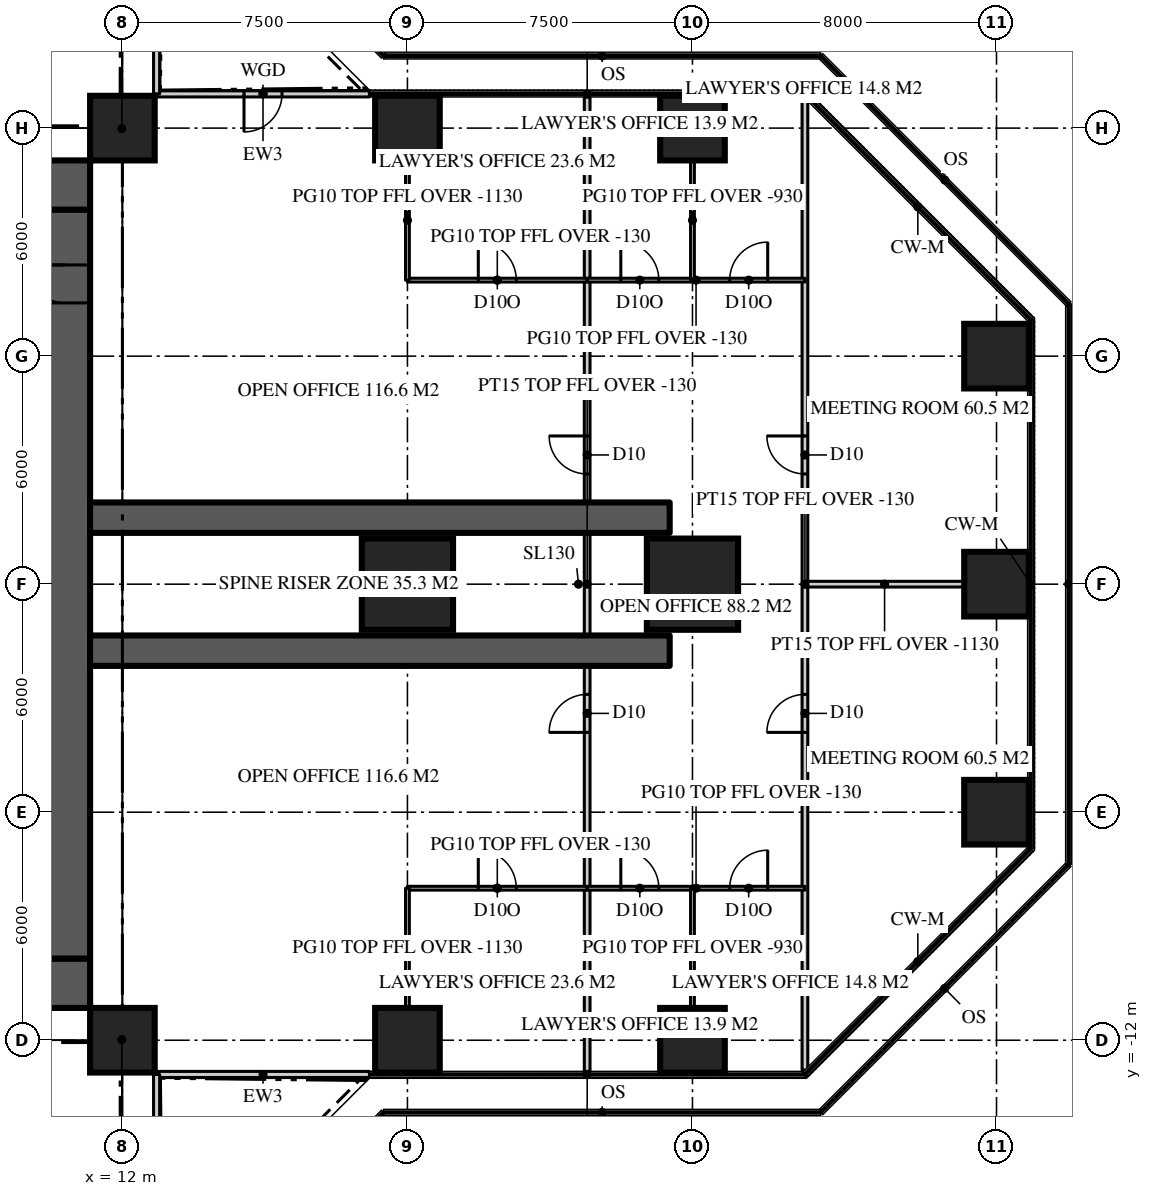
"""IFC4 building model, lengths in metres.
Left out: names, types, materials, properties, quantities, classifications, styles, units other than length and angle.
Written with IfcOpenShell. Run it as: python <this file> out.ifc"""

import sys

from ifc_helpers import new_model, si_unit, direction, frame, frame_2d, origin, origin_2d, place, context, subcontext, project, spatial, rectangle, extrude, element, fill, save


model = new_model("IFC4")
c1 = context("Model", 3, precision=1e-05, world=origin(), true_north=direction((0.0, 1.0)))
c2 = subcontext(c1, "Body", "Model", "MODEL_VIEW")
j1 = project(units=[si_unit("LENGTHUNIT", "METRE"), si_unit("PLANEANGLEUNIT", "RADIAN")], contexts=[c1])
p1 = place(None, origin())
s1 = spatial("IfcSite", under=j1, at=p1, CompositionType="ELEMENT")
p2 = place(p1, origin())
s2 = spatial("IfcBuilding", under=s1, at=p2, CompositionType="ELEMENT")
p3 = place(p2, frame((0.0, 0.0, 139.8)))
s3 = spatial("IfcBuildingStorey", under=s2, at=p3, CompositionType="ELEMENT", Elevation=139.8)
p4 = place(p3, frame((-11.15, 10.5, 0.0), z_axis=(0.0, 0.0, 1.0), x_axis=(1.0, 0.0, 0.0)))
e1 = element("IfcWall", 1, at=p4, inside=s3, PredefinedType="SHEAR", context=c2, shape_type="SweptSolid", body=[
    extrude(rectangle(XDim=22.3, YDim=1.3, at=frame_2d((11.15, 0.0))), origin(), (0.0, 0.0, 1.0), 3.9),
])
p5 = place(p4, frame((4.25, 0.0, 0.0)))
e2 = element("IfcOpeningElement", 2, at=p5, cuts=e1, PredefinedType="OPENING", context=c2, shape_type="SweptSolid", body=[
    extrude(rectangle(XDim=1.8, YDim=2.2, at=frame_2d((0.9, 1.1))), frame((0.0, 0.66, 0.0), z_axis=(0.0, -1.0, 0.0), x_axis=(1.0, 0.0, 0.0)), (0.0, 0.0, 1.0), 1.32),
])
p6 = place(p4, frame((16.25, 0.0, 0.0)))
e3 = element("IfcOpeningElement", 3, at=p6, cuts=e1, PredefinedType="OPENING", context=c2, shape_type="SweptSolid", body=[
    extrude(rectangle(XDim=1.8, YDim=2.2, at=frame_2d((0.9, 1.1))), frame((0.0, 0.66, 0.0), z_axis=(0.0, -1.0, 0.0), x_axis=(1.0, 0.0, 0.0)), (0.0, 0.0, 1.0), 1.32),
])
p7 = place(p3, frame((11.15, -10.5, 0.0), z_axis=(0.0, 0.0, 1.0), x_axis=(-1.0, 0.0, 0.0)))
e4 = element("IfcWall", 4, at=p7, inside=s3, PredefinedType="SHEAR", context=c2, shape_type="SweptSolid", body=[
    extrude(rectangle(XDim=22.3, YDim=1.3, at=frame_2d((11.15, 0.0))), origin(), (0.0, 0.0, 1.0), 3.9),
])
p8 = place(p7, frame((16.25, 0.0, 0.0)))
e5 = element("IfcOpeningElement", 5, at=p8, cuts=e4, PredefinedType="OPENING", context=c2, shape_type="SweptSolid", body=[
    extrude(rectangle(XDim=1.8, YDim=2.2, at=frame_2d((0.9, 1.1))), frame((0.0, 0.66, 0.0), z_axis=(0.0, -1.0, 0.0), x_axis=(1.0, 0.0, 0.0)), (0.0, 0.0, 1.0), 1.32),
])
p9 = place(p7, frame((4.25, 0.0, 0.0)))
e6 = element("IfcOpeningElement", 6, at=p9, cuts=e4, PredefinedType="OPENING", context=c2, shape_type="SweptSolid", body=[
    extrude(rectangle(XDim=1.8, YDim=2.2, at=frame_2d((0.9, 1.1))), frame((0.0, 0.66, 0.0), z_axis=(0.0, -1.0, 0.0), x_axis=(1.0, 0.0, 0.0)), (0.0, 0.0, 1.0), 1.32),
])
p10 = place(p3, frame((10.5, -9.85, 0.0), z_axis=(0.0, 0.0, 1.0), x_axis=(0.0, 1.0, 0.0)))
e7 = element("IfcWall", 7, at=p10, inside=s3, PredefinedType="SHEAR", context=c2, shape_type="SweptSolid", body=[
    extrude(rectangle(XDim=19.7, YDim=1.3, at=frame_2d((9.85, 0.0))), origin(), (0.0, 0.0, 1.0), 3.9),
])
p11 = place(p10, frame((17.25, 0.0, 0.0)))
e8 = element("IfcOpeningElement", 8, at=p11, cuts=e7, PredefinedType="OPENING", context=c2, shape_type="SweptSolid", body=[
    extrude(rectangle(XDim=1.0, YDim=2.2, at=frame_2d((0.5, 1.1))), frame((0.0, 0.66, 0.0), z_axis=(0.0, -1.0, 0.0), x_axis=(1.0, 0.0, 0.0)), (0.0, 0.0, 1.0), 1.32),
])
for number, where, z_axis, x_axis in (
    (9, (11.15, -1.75, 0.0), (0.0, 0.0, 1.0), (1.0, 0.0, 0.0)),
    (10, (11.15, 1.75, 0.0), (0.0, 0.0, 1.0), (1.0, 0.0, 0.0)),
):
    element("IfcWall", number, at=place(p3, frame(where, z_axis=z_axis, x_axis=x_axis)), inside=s3, PredefinedType="SHEAR", context=c2, shape_type="SweptSolid", body=[
        extrude(rectangle(XDim=15.25, YDim=0.8, at=frame_2d((7.625, 0.0))), origin(), (0.0, 0.0, 1.0), 3.9),
    ])
for number, where, z_axis, x_axis in (
    (11, (12.0, -12.0, 0.0), (0.0, 0.0, 1.0), (1.0, 0.0, 0.0)),
    (12, (19.5, -12.0, 0.0), (0.0, 0.0, 1.0), (1.0, 0.0, 0.0)),
    (13, (27.0, -12.0, 0.0), (0.0, 0.0, 1.0), (1.0, 0.0, 0.0)),
    (14, (35.0, -6.0, 0.0), (0.0, 0.0, 1.0), (1.0, 0.0, 0.0)),
):
    element("IfcColumn", number, at=place(p3, frame(where, z_axis=z_axis, x_axis=x_axis)), inside=s3, PredefinedType="COLUMN", context=c2, shape_type="SweptSolid", body=[
        extrude(rectangle(XDim=1.7, YDim=1.7, at=origin_2d()), origin(), (0.0, 0.0, 1.0), 3.9),
    ])
for number, where, z_axis, x_axis in (
    (15, (19.5, 0.0, 0.0), (0.0, 0.0, 1.0), (1.0, 0.0, 0.0)),
    (16, (27.0, 0.0, 0.0), (0.0, 0.0, 1.0), (1.0, 0.0, 0.0)),
):
    element("IfcColumn", number, at=place(p3, frame(where, z_axis=z_axis, x_axis=x_axis)), inside=s3, PredefinedType="COLUMN", context=c2, shape_type="SweptSolid", body=[
        extrude(rectangle(XDim=2.4, YDim=2.4, at=origin_2d()), origin(), (0.0, 0.0, 1.0), 3.9),
    ])
for number, where, z_axis, x_axis in (
    (17, (35.0, 0.0, 0.0), (0.0, 0.0, 1.0), (1.0, 0.0, 0.0)),
    (18, (35.0, 6.0, 0.0), (0.0, 0.0, 1.0), (1.0, 0.0, 0.0)),
    (19, (12.0, 12.0, 0.0), (0.0, 0.0, 1.0), (1.0, 0.0, 0.0)),
    (20, (19.5, 12.0, 0.0), (0.0, 0.0, 1.0), (1.0, 0.0, 0.0)),
    (21, (27.0, 12.0, 0.0), (0.0, 0.0, 1.0), (1.0, 0.0, 0.0)),
):
    element("IfcColumn", number, at=place(p3, frame(where, z_axis=z_axis, x_axis=x_axis)), inside=s3, PredefinedType="COLUMN", context=c2, shape_type="SweptSolid", body=[
        extrude(rectangle(XDim=1.7, YDim=1.7, at=origin_2d()), origin(), (0.0, 0.0, 1.0), 3.9),
    ])
p12 = place(p3, frame((12.9, -12.9, 0.0), z_axis=(0.0, 0.0, 1.0), x_axis=(1.0, 0.0, 0.0)))
e22 = element("IfcWall", 22, at=p12, inside=s3, PredefinedType="SOLIDWALL", context=c2, shape_type="SweptSolid", body=[
    extrude(rectangle(XDim=5.6, YDim=0.16, at=frame_2d((2.8, 0.0))), origin(), (0.0, 0.0, 1.0), 3.77),
])
p13 = place(p3, frame((18.5, 12.9, 0.0), z_axis=(0.0, 0.0, 1.0), x_axis=(-1.0, 0.0, 0.0)))
e23 = element("IfcWall", 23, at=p13, inside=s3, PredefinedType="SOLIDWALL", context=c2, shape_type="SweptSolid", body=[
    extrude(rectangle(XDim=5.6, YDim=0.16, at=frame_2d((2.8, 0.0))), origin(), (0.0, 0.0, 1.0), 3.77),
])
p14 = place(p13, frame((2.3, 0.0, 0.0)))
e24 = element("IfcOpeningElement", 24, at=p14, cuts=e23, PredefinedType="OPENING", context=c2, shape_type="SweptSolid", body=[
    extrude(rectangle(XDim=1.0, YDim=2.2, at=frame_2d((0.5, 1.1))), frame((0.0, 0.09, 0.0), z_axis=(0.0, -1.0, 0.0), x_axis=(1.0, 0.0, 0.0)), (0.0, 0.0, 1.0), 0.18),
])
p15 = place(p3, frame((12.9, 12.9, 0.0), z_axis=(0.0, 0.0, 1.0), x_axis=(0.0, 1.0, 0.0)))
e25 = element("IfcWall", 25, at=p15, inside=s3, PredefinedType="SOLIDWALL", context=c2, shape_type="SweptSolid", body=[
    extrude(rectangle(XDim=5.6, YDim=0.16, at=frame_2d((2.8, 0.0))), origin(), (0.0, 0.0, 1.0), 3.77),
])
p16 = place(p3, frame((12.9, -18.5, 0.0), z_axis=(0.0, 0.0, 1.0), x_axis=(0.0, 1.0, 0.0)))
e26 = element("IfcWall", 26, at=p16, inside=s3, PredefinedType="SOLIDWALL", context=c2, shape_type="SweptSolid", body=[
    extrude(rectangle(XDim=5.6, YDim=0.16, at=frame_2d((2.8, 0.0))), origin(), (0.0, 0.0, 1.0), 3.77),
])
p17 = place(p16, frame((2.3, 0.0, 0.0)))
e27 = element("IfcOpeningElement", 27, at=p17, cuts=e26, PredefinedType="OPENING", context=c2, shape_type="SweptSolid", body=[
    extrude(rectangle(XDim=1.0, YDim=2.2, at=frame_2d((0.5, 1.1))), frame((0.0, 0.09, 0.0), z_axis=(0.0, -1.0, 0.0), x_axis=(1.0, 0.0, 0.0)), (0.0, 0.0, 1.0), 0.18),
])
p18 = place(p3, frame((24.229, -12.82, 0.0), z_axis=(0.0, 0.0, 1.0), x_axis=(0.0, 1.0, 0.0)))
e28 = element("IfcWall", 28, at=p18, inside=s3, PredefinedType="PARTITIONING", context=c2, shape_type="SweptSolid", body=[
    extrude(rectangle(XDim=25.64, YDim=0.15, at=frame_2d((12.82, 0.0))), origin(), (0.0, 0.0, 1.0), 3.77),
])
p19 = place(p18, frame((15.72, 0.0, 0.0)))
e29 = element("IfcOpeningElement", 29, at=p19, cuts=e28, PredefinedType="OPENING", context=c2, shape_type="SweptSolid", body=[
    extrude(rectangle(XDim=1.0, YDim=2.2, at=frame_2d((0.5, 1.1))), frame((0.0, 0.085, 0.0), z_axis=(0.0, -1.0, 0.0), x_axis=(1.0, 0.0, 0.0)), (0.0, 0.0, 1.0), 0.17),
])
p20 = place(p18, frame((8.92, 0.0, 0.0)))
e30 = element("IfcOpeningElement", 30, at=p20, cuts=e28, PredefinedType="OPENING", context=c2, shape_type="SweptSolid", body=[
    extrude(rectangle(XDim=1.0, YDim=2.2, at=frame_2d((0.5, 1.1))), frame((0.0, 0.085, 0.0), z_axis=(0.0, -1.0, 0.0), x_axis=(1.0, 0.0, 0.0)), (0.0, 0.0, 1.0), 0.17),
])
p21 = place(p3, frame((29.959, -12.786, 0.0), z_axis=(0.0, 0.0, 1.0), x_axis=(0.0, 1.0, 0.0)))
e31 = element("IfcWall", 31, at=p21, inside=s3, PredefinedType="PARTITIONING", context=c2, shape_type="SweptSolid", body=[
    extrude(rectangle(XDim=25.573, YDim=0.15, at=frame_2d((12.786, 0.0))), origin(), (0.0, 0.0, 1.0), 3.77),
])
p22 = place(p21, frame((15.687, 0.0, 0.0)))
e32 = element("IfcOpeningElement", 32, at=p22, cuts=e31, PredefinedType="OPENING", context=c2, shape_type="SweptSolid", body=[
    extrude(rectangle(XDim=1.0, YDim=2.2, at=frame_2d((0.5, 1.1))), frame((0.0, 0.085, 0.0), z_axis=(0.0, -1.0, 0.0), x_axis=(1.0, 0.0, 0.0)), (0.0, 0.0, 1.0), 0.17),
])
p23 = place(p21, frame((8.886, 0.0, 0.0)))
e33 = element("IfcOpeningElement", 33, at=p23, cuts=e31, PredefinedType="OPENING", context=c2, shape_type="SweptSolid", body=[
    extrude(rectangle(XDim=1.0, YDim=2.2, at=frame_2d((0.5, 1.1))), frame((0.0, 0.085, 0.0), z_axis=(0.0, -1.0, 0.0), x_axis=(1.0, 0.0, 0.0)), (0.0, 0.0, 1.0), 0.17),
])
p24 = place(p3, frame((29.959, 0.0, 0.0), z_axis=(0.0, 0.0, 1.0), x_axis=(1.0, 0.0, 0.0)))
e34 = element("IfcWall", 34, at=p24, inside=s3, PredefinedType="PARTITIONING", context=c2, shape_type="SweptSolid", body=[
    extrude(rectangle(XDim=4.191, YDim=0.15, at=frame_2d((2.095, 0.0))), origin(), (0.0, 0.0, 1.0), 2.77),
])
p25 = place(p3, frame((19.5, 8.0, 0.0), z_axis=(0.0, 0.0, 1.0), x_axis=(1.0, 0.0, 0.0)))
e35 = element("IfcWall", 35, at=p25, inside=s3, PredefinedType="PARTITIONING", context=c2, shape_type="SweptSolid", body=[
    extrude(rectangle(XDim=4.729, YDim=0.1, at=frame_2d((2.365, 0.0))), origin(), (0.0, 0.0, 1.0), 3.77),
])
p26 = place(p25, frame((1.865, 0.0, 0.0)))
e36 = element("IfcOpeningElement", 36, at=p26, cuts=e35, PredefinedType="OPENING", context=c2, shape_type="SweptSolid", body=[
    extrude(rectangle(XDim=1.0, YDim=2.2, at=frame_2d((0.5, 1.1))), frame((0.0, 0.06, 0.0), z_axis=(0.0, -1.0, 0.0), x_axis=(1.0, 0.0, 0.0)), (0.0, 0.0, 1.0), 0.12),
])
p27 = place(p3, frame((24.229, 8.0, 0.0), z_axis=(0.0, 0.0, 1.0), x_axis=(1.0, 0.0, 0.0)))
e37 = element("IfcWall", 37, at=p27, inside=s3, PredefinedType="PARTITIONING", context=c2, shape_type="SweptSolid", body=[
    extrude(rectangle(XDim=5.73, YDim=0.1, at=frame_2d((2.865, 0.0))), origin(), (0.0, 0.0, 1.0), 3.77),
])
p28 = place(p27, frame((0.885, 0.0, 0.0)))
e38 = element("IfcOpeningElement", 38, at=p28, cuts=e37, PredefinedType="OPENING", context=c2, shape_type="SweptSolid", body=[
    extrude(rectangle(XDim=1.0, YDim=2.2, at=frame_2d((0.5, 1.1))), frame((0.0, 0.06, 0.0), z_axis=(0.0, -1.0, 0.0), x_axis=(1.0, 0.0, 0.0)), (0.0, 0.0, 1.0), 0.12),
])
p29 = place(p27, frame((3.75, 0.0, 0.0)))
e39 = element("IfcOpeningElement", 39, at=p29, cuts=e37, PredefinedType="OPENING", context=c2, shape_type="SweptSolid", body=[
    extrude(rectangle(XDim=1.0, YDim=2.2, at=frame_2d((0.5, 1.1))), frame((0.0, 0.06, 0.0), z_axis=(0.0, -1.0, 0.0), x_axis=(1.0, 0.0, 0.0)), (0.0, 0.0, 1.0), 0.12),
])
p30 = place(p3, frame((19.5, 8.0, 0.0), z_axis=(0.0, 0.0, 1.0), x_axis=(0.0, 1.0, 0.0)))
e40 = element("IfcWall", 40, at=p30, inside=s3, PredefinedType="PARTITIONING", context=c2, shape_type="SweptSolid", body=[
    extrude(rectangle(XDim=3.15, YDim=0.1, at=frame_2d((1.575, 0.0))), origin(), (0.0, 0.0, 1.0), 2.77),
])
p31 = place(p3, frame((27.0, 8.0, 0.0), z_axis=(0.0, 0.0, 1.0), x_axis=(0.0, 1.0, 0.0)))
e41 = element("IfcWall", 41, at=p31, inside=s3, PredefinedType="PARTITIONING", context=c2, shape_type="SweptSolid", body=[
    extrude(rectangle(XDim=3.15, YDim=0.1, at=frame_2d((1.575, 0.0))), origin(), (0.0, 0.0, 1.0), 2.97),
])
p32 = place(p3, frame((19.5, -8.0, 0.0), z_axis=(0.0, 0.0, 1.0), x_axis=(1.0, 0.0, 0.0)))
e42 = element("IfcWall", 42, at=p32, inside=s3, PredefinedType="PARTITIONING", context=c2, shape_type="SweptSolid", body=[
    extrude(rectangle(XDim=4.729, YDim=0.1, at=frame_2d((2.365, 0.0))), origin(), (0.0, 0.0, 1.0), 3.77),
])
p33 = place(p32, frame((1.865, 0.0, 0.0)))
e43 = element("IfcOpeningElement", 43, at=p33, cuts=e42, PredefinedType="OPENING", context=c2, shape_type="SweptSolid", body=[
    extrude(rectangle(XDim=1.0, YDim=2.2, at=frame_2d((0.5, 1.1))), frame((0.0, 0.06, 0.0), z_axis=(0.0, -1.0, 0.0), x_axis=(1.0, 0.0, 0.0)), (0.0, 0.0, 1.0), 0.12),
])
p34 = place(p3, frame((24.229, -8.0, 0.0), z_axis=(0.0, 0.0, 1.0), x_axis=(1.0, 0.0, 0.0)))
e44 = element("IfcWall", 44, at=p34, inside=s3, PredefinedType="PARTITIONING", context=c2, shape_type="SweptSolid", body=[
    extrude(rectangle(XDim=5.73, YDim=0.1, at=frame_2d((2.865, 0.0))), origin(), (0.0, 0.0, 1.0), 3.77),
])
p35 = place(p34, frame((0.885, 0.0, 0.0)))
e45 = element("IfcOpeningElement", 45, at=p35, cuts=e44, PredefinedType="OPENING", context=c2, shape_type="SweptSolid", body=[
    extrude(rectangle(XDim=1.0, YDim=2.2, at=frame_2d((0.5, 1.1))), frame((0.0, 0.06, 0.0), z_axis=(0.0, -1.0, 0.0), x_axis=(1.0, 0.0, 0.0)), (0.0, 0.0, 1.0), 0.12),
])
p36 = place(p34, frame((3.75, 0.0, 0.0)))
e46 = element("IfcOpeningElement", 46, at=p36, cuts=e44, PredefinedType="OPENING", context=c2, shape_type="SweptSolid", body=[
    extrude(rectangle(XDim=1.0, YDim=2.2, at=frame_2d((0.5, 1.1))), frame((0.0, 0.06, 0.0), z_axis=(0.0, -1.0, 0.0), x_axis=(1.0, 0.0, 0.0)), (0.0, 0.0, 1.0), 0.12),
])
p37 = place(p3, frame((19.5, -8.0, 0.0), z_axis=(0.0, 0.0, 1.0), x_axis=(0.0, -1.0, 0.0)))
e47 = element("IfcWall", 47, at=p37, inside=s3, PredefinedType="PARTITIONING", context=c2, shape_type="SweptSolid", body=[
    extrude(rectangle(XDim=3.15, YDim=0.1, at=frame_2d((1.575, 0.0))), origin(), (0.0, 0.0, 1.0), 2.77),
])
p38 = place(p3, frame((27.0, -8.0, 0.0), z_axis=(0.0, 0.0, 1.0), x_axis=(0.0, -1.0, 0.0)))
e48 = element("IfcWall", 48, at=p38, inside=s3, PredefinedType="PARTITIONING", context=c2, shape_type="SweptSolid", body=[
    extrude(rectangle(XDim=3.15, YDim=0.1, at=frame_2d((1.575, 0.0))), origin(), (0.0, 0.0, 1.0), 2.97),
])
for number, where, z_axis, x_axis in (
    (49, (11.15, 11.15, 0.0), (0.0, 0.0, 1.0), (0.707, 0.707, 0.0)),
    (50, (11.15, -11.15, 0.0), (0.0, 0.0, 1.0), (0.707, -0.707, 0.0)),
):
    element("IfcWall", number, at=place(p3, frame(where, z_axis=z_axis, x_axis=x_axis)), inside=s3, PredefinedType="PARTITIONING", context=c2, shape_type="SweptSolid", body=[
        extrude(rectangle(XDim=2.362, YDim=0.15, at=frame_2d((1.181, 0.0))), origin(), (0.0, 0.0, 1.0), 3.22),
    ])
p39 = place(p14, origin())
e51 = element("IfcDoor", 51, at=p39, inside=s3, OperationType="SINGLE_SWING_RIGHT", PredefinedType="DOOR", context=c2, shape_type="SweptSolid", body=[
    extrude(rectangle(XDim=1.0, YDim=2.2, at=frame_2d((0.5, 1.1))), frame((0.0, 0.025, 0.0), z_axis=(0.0, -1.0, 0.0), x_axis=(1.0, 0.0, 0.0)), (0.0, 0.0, 1.0), 0.05),
])
fill(e24, e51)
p40 = place(p11, origin())
e52 = element("IfcDoor", 52, at=p40, inside=s3, OperationType="SINGLE_SWING_RIGHT", PredefinedType="DOOR", context=c2, shape_type="SweptSolid", body=[
    extrude(rectangle(XDim=1.0, YDim=2.2, at=frame_2d((0.5, 1.1))), frame((0.0, 0.025, 0.0), z_axis=(0.0, -1.0, 0.0), x_axis=(1.0, 0.0, 0.0)), (0.0, 0.0, 1.0), 0.05),
])
fill(e8, e52)
p41 = place(p19, origin())
e53 = element("IfcDoor", 53, at=p41, inside=s3, OperationType="SINGLE_SWING_RIGHT", PredefinedType="DOOR", context=c2, shape_type="SweptSolid", body=[
    extrude(rectangle(XDim=1.0, YDim=2.2, at=frame_2d((0.5, 1.1))), frame((0.0, 0.025, 0.0), z_axis=(0.0, -1.0, 0.0), x_axis=(1.0, 0.0, 0.0)), (0.0, 0.0, 1.0), 0.05),
])
fill(e29, e53)
p42 = place(p20, origin())
e54 = element("IfcDoor", 54, at=p42, inside=s3, OperationType="SINGLE_SWING_LEFT", PredefinedType="DOOR", context=c2, shape_type="SweptSolid", body=[
    extrude(rectangle(XDim=1.0, YDim=2.2, at=frame_2d((0.5, 1.1))), frame((0.0, 0.025, 0.0), z_axis=(0.0, -1.0, 0.0), x_axis=(1.0, 0.0, 0.0)), (0.0, 0.0, 1.0), 0.05),
])
fill(e30, e54)
p43 = place(p22, origin())
e55 = element("IfcDoor", 55, at=p43, inside=s3, OperationType="SINGLE_SWING_RIGHT", PredefinedType="DOOR", context=c2, shape_type="SweptSolid", body=[
    extrude(rectangle(XDim=1.0, YDim=2.2, at=frame_2d((0.5, 1.1))), frame((0.0, 0.025, 0.0), z_axis=(0.0, -1.0, 0.0), x_axis=(1.0, 0.0, 0.0)), (0.0, 0.0, 1.0), 0.05),
])
fill(e32, e55)
p44 = place(p23, origin())
e56 = element("IfcDoor", 56, at=p44, inside=s3, OperationType="SINGLE_SWING_LEFT", PredefinedType="DOOR", context=c2, shape_type="SweptSolid", body=[
    extrude(rectangle(XDim=1.0, YDim=2.2, at=frame_2d((0.5, 1.1))), frame((0.0, 0.025, 0.0), z_axis=(0.0, -1.0, 0.0), x_axis=(1.0, 0.0, 0.0)), (0.0, 0.0, 1.0), 0.05),
])
fill(e33, e56)
p45 = place(p26, origin())
e57 = element("IfcDoor", 57, at=p45, inside=s3, OperationType="SINGLE_SWING_LEFT", PredefinedType="DOOR", context=c2, shape_type="SweptSolid", body=[
    extrude(rectangle(XDim=1.0, YDim=2.2, at=frame_2d((0.5, 1.1))), frame((0.0, 0.025, 0.0), z_axis=(0.0, -1.0, 0.0), x_axis=(1.0, 0.0, 0.0)), (0.0, 0.0, 1.0), 0.05),
])
fill(e36, e57)
p46 = place(p28, origin())
e58 = element("IfcDoor", 58, at=p46, inside=s3, OperationType="SINGLE_SWING_LEFT", PredefinedType="DOOR", context=c2, shape_type="SweptSolid", body=[
    extrude(rectangle(XDim=1.0, YDim=2.2, at=frame_2d((0.5, 1.1))), frame((0.0, 0.025, 0.0), z_axis=(0.0, -1.0, 0.0), x_axis=(1.0, 0.0, 0.0)), (0.0, 0.0, 1.0), 0.05),
])
fill(e38, e58)
p47 = place(p29, origin())
e59 = element("IfcDoor", 59, at=p47, inside=s3, OperationType="SINGLE_SWING_RIGHT", PredefinedType="DOOR", context=c2, shape_type="SweptSolid", body=[
    extrude(rectangle(XDim=1.0, YDim=2.2, at=frame_2d((0.5, 1.1))), frame((0.0, 0.025, 0.0), z_axis=(0.0, -1.0, 0.0), x_axis=(1.0, 0.0, 0.0)), (0.0, 0.0, 1.0), 0.05),
])
fill(e39, e59)
p48 = place(p33, origin())
e60 = element("IfcDoor", 60, at=p48, inside=s3, OperationType="SINGLE_SWING_LEFT", PredefinedType="DOOR", context=c2, shape_type="SweptSolid", body=[
    extrude(rectangle(XDim=1.0, YDim=2.2, at=frame_2d((0.5, 1.1))), frame((0.0, 0.025, 0.0), z_axis=(0.0, -1.0, 0.0), x_axis=(1.0, 0.0, 0.0)), (0.0, 0.0, 1.0), 0.05),
])
fill(e43, e60)
p49 = place(p35, origin())
e61 = element("IfcDoor", 61, at=p49, inside=s3, OperationType="SINGLE_SWING_LEFT", PredefinedType="DOOR", context=c2, shape_type="SweptSolid", body=[
    extrude(rectangle(XDim=1.0, YDim=2.2, at=frame_2d((0.5, 1.1))), frame((0.0, 0.025, 0.0), z_axis=(0.0, -1.0, 0.0), x_axis=(1.0, 0.0, 0.0)), (0.0, 0.0, 1.0), 0.05),
])
fill(e45, e61)
p50 = place(p36, origin())
e62 = element("IfcDoor", 62, at=p50, inside=s3, OperationType="SINGLE_SWING_RIGHT", PredefinedType="DOOR", context=c2, shape_type="SweptSolid", body=[
    extrude(rectangle(XDim=1.0, YDim=2.2, at=frame_2d((0.5, 1.1))), frame((0.0, 0.025, 0.0), z_axis=(0.0, -1.0, 0.0), x_axis=(1.0, 0.0, 0.0)), (0.0, 0.0, 1.0), 0.05),
])
fill(e46, e62)
save(model, sys.argv[1])
